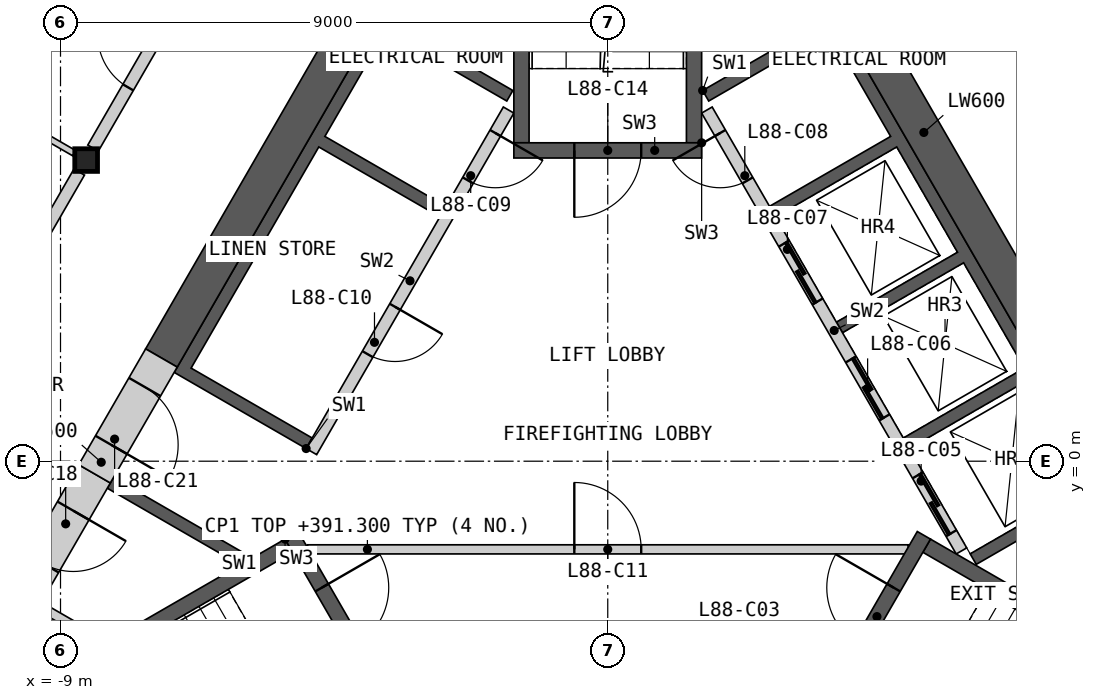
"""IFC4 building model, lengths in metres.
Left out: names, types, materials, properties, quantities, classifications, styles, units other than length and angle.
Written with IfcOpenShell. Run it as: python <this file> out.ifc"""

import sys

from ifc_helpers import new_model, si_unit, direction, frame, frame_2d, origin, origin_2d, place, context, subcontext, project, spatial, polyline, rectangle, i_section, outline, extrude, element, fill, save


model = new_model("IFC4")
c1 = context("Model", 3, precision=1e-05, world=origin(), true_north=direction((0.0, 1.0)))
c2 = subcontext(c1, "Body", "Model", "MODEL_VIEW")
j1 = project(units=[si_unit("LENGTHUNIT", "METRE"), si_unit("PLANEANGLEUNIT", "RADIAN")], contexts=[c1])
p1 = place(None, origin())
s1 = spatial("IfcSite", under=j1, at=p1, CompositionType="ELEMENT")
p2 = place(p1, origin())
s2 = spatial("IfcBuilding", under=s1, at=p2, CompositionType="ELEMENT")
p3 = place(p2, frame((0.0, 0.0, 388.2)))
s3 = spatial("IfcBuildingStorey", under=s2, at=p3, CompositionType="ELEMENT", Elevation=388.2)
p4 = place(p3, frame((-8.578, 4.953, 0.0), z_axis=(0.0, 0.0, 1.0), x_axis=(1.0, 0.0, 0.0)))
e1 = element("IfcColumn", 1, at=p4, inside=s3, PredefinedType="COLUMN", context=c2, shape_type="SweptSolid", body=[
    extrude(i_section(OverallWidth=0.374, OverallDepth=0.372, WebThickness=0.016, FlangeThickness=0.026, at=origin_2d()), origin(), (0.0, 0.0, 1.0), 3.4),
])
p5 = place(p3, origin())
e2 = element("IfcWall", 2, at=p5, inside=s3, PredefinedType="SHEAR", context=c2, shape_type="SweptSolid", body=[
    extrude(outline(polyline([(1.561, 6.097), (3.731, 7.35), (8.231, -0.444), (6.061, -1.697), (5.96, -1.524), (7.952, -0.374), (6.952, 1.358), (4.96, 0.208), (4.861, 0.381), (6.852, 1.531), (5.852, 3.263), (3.861, 2.113), (3.76, 2.287), (5.752, 3.437), (4.752, 5.169), (2.76, 4.019), (2.66, 4.192), (4.652, 5.342), (3.652, 7.074), (1.66, 5.924), (1.561, 6.097)])), origin(), (0.0, 0.0, 1.0), 3.1),
])
p6 = place(p3, frame((5.817, -1.476, 0.0), z_axis=(0.0, 0.0, 1.0), x_axis=(-0.500002616675, 0.866023893041, 0.0)))
e3 = element("IfcWall", 3, at=p6, inside=s3, PredefinedType="SOLIDWALL", context=c2, shape_type="SweptSolid", body=[
    extrude(rectangle(XDim=8.373, YDim=0.2, at=frame_2d((4.187, 0.0))), origin(), (0.0, 0.0, 1.0), 3.1),
])
p7 = place(p6, frame((0.337, 0.0, 0.0)))
e4 = element("IfcOpeningElement", 4, at=p7, cuts=e3, PredefinedType="OPENING", context=c2, shape_type="SweptSolid", body=[
    extrude(rectangle(XDim=1.1, YDim=2.1, at=frame_2d((0.55, 1.05))), frame((0.0, 0.11, 0.0), z_axis=(0.0, -1.0, 0.0), x_axis=(1.0, 0.0, 0.0)), (0.0, 0.0, 1.0), 0.22),
])
p8 = place(p6, frame((2.537, 0.0, 0.0)))
e5 = element("IfcOpeningElement", 5, at=p8, cuts=e3, PredefinedType="OPENING", context=c2, shape_type="SweptSolid", body=[
    extrude(rectangle(XDim=1.1, YDim=2.1, at=frame_2d((0.55, 1.05))), frame((0.0, 0.11, 0.0), z_axis=(0.0, -1.0, 0.0), x_axis=(1.0, 0.0, 0.0)), (0.0, 0.0, 1.0), 0.22),
])
p9 = place(p6, frame((4.737, 0.0, 0.0)))
e6 = element("IfcOpeningElement", 6, at=p9, cuts=e3, PredefinedType="OPENING", context=c2, shape_type="SweptSolid", body=[
    extrude(rectangle(XDim=1.1, YDim=2.1, at=frame_2d((0.55, 1.05))), frame((0.0, 0.11, 0.0), z_axis=(0.0, -1.0, 0.0), x_axis=(1.0, 0.0, 0.0)), (0.0, 0.0, 1.0), 0.22),
])
p10 = place(p6, frame((7.037, 0.0, 0.0)))
e7 = element("IfcOpeningElement", 7, at=p10, cuts=e3, PredefinedType="OPENING", context=c2, shape_type="SweptSolid", body=[
    extrude(rectangle(XDim=0.9, YDim=2.1, at=frame_2d((0.45, 1.05))), frame((0.0, 0.11, 0.0), z_axis=(0.0, -1.0, 0.0), x_axis=(1.0, 0.0, 0.0)), (0.0, 0.0, 1.0), 0.22),
])
p11 = place(p3, origin())
e8 = element("IfcWall", 8, at=p11, inside=s3, PredefinedType="SHEAR", context=c2, shape_type="SweptSolid", body=[
    extrude(outline(polyline([(-6.061, -1.697), (-8.231, -0.444), (-8.131, -0.271), (-5.96, -1.524), (-6.061, -1.697)])), origin(), (0.0, 0.0, 1.0), 3.1),
])
p12 = place(p3, origin())
e9 = element("IfcWall", 9, at=p12, inside=s3, PredefinedType="SHEAR", context=c2, shape_type="SweptSolid", body=[
    extrude(outline(polyline([(-4.96, 0.208), (-7.131, 1.461), (-3.731, 7.35), (-1.561, 6.097), (-1.66, 5.924), (-3.652, 7.074), (-4.652, 5.342), (-2.66, 4.192), (-2.76, 4.019), (-4.752, 5.169), (-6.852, 1.531), (-4.861, 0.381), (-4.96, 0.208)])), origin(), (0.0, 0.0, 1.0), 3.1),
])
p13 = place(p3, frame((-1.631, 5.776, 0.0), z_axis=(0.0, 0.0, 1.0), x_axis=(-0.499992876559, -0.866029516466, 0.0)))
e10 = element("IfcWall", 10, at=p13, inside=s3, PredefinedType="SOLIDWALL", context=c2, shape_type="SweptSolid", body=[
    extrude(rectangle(XDim=6.486, YDim=0.2, at=frame_2d((3.243, 0.0))), origin(), (0.0, 0.0, 1.0), 3.1),
])
p14 = place(p13, frame((0.437, 0.0, 0.0)))
e11 = element("IfcOpeningElement", 11, at=p14, cuts=e10, PredefinedType="OPENING", context=c2, shape_type="SweptSolid", body=[
    extrude(rectangle(XDim=0.9, YDim=2.1, at=frame_2d((0.45, 1.05))), frame((0.0, 0.11, 0.0), z_axis=(0.0, -1.0, 0.0), x_axis=(1.0, 0.0, 0.0)), (0.0, 0.0, 1.0), 0.22),
])
p15 = place(p13, frame((3.737, 0.0, 0.0)))
e12 = element("IfcOpeningElement", 12, at=p15, cuts=e10, PredefinedType="OPENING", context=c2, shape_type="SweptSolid", body=[
    extrude(rectangle(XDim=0.9, YDim=2.1, at=frame_2d((0.45, 1.05))), frame((0.0, 0.11, 0.0), z_axis=(0.0, -1.0, 0.0), x_axis=(1.0, 0.0, 0.0)), (0.0, 0.0, 1.0), 0.22),
])
p16 = place(p3, frame((-4.941, -1.45, 0.0), z_axis=(0.0, 0.0, 1.0), x_axis=(1.0, 0.0, 0.0)))
e13 = element("IfcWall", 13, at=p16, inside=s3, PredefinedType="PARTITIONING", context=c2, shape_type="SweptSolid", body=[
    extrude(rectangle(XDim=9.882, YDim=0.15, at=frame_2d((4.941, 0.0))), origin(), (0.0, 0.0, 1.0), 3.1),
])
p17 = place(p16, frame((4.391, 0.0, 0.0)))
e14 = element("IfcOpeningElement", 14, at=p17, cuts=e13, PredefinedType="OPENING", context=c2, shape_type="SweptSolid", body=[
    extrude(rectangle(XDim=1.1, YDim=2.1, at=frame_2d((0.55, 1.05))), frame((0.0, 0.085, 0.0), z_axis=(0.0, -1.0, 0.0), x_axis=(1.0, 0.0, 0.0)), (0.0, 0.0, 1.0), 0.17),
])
p18 = place(p3, origin())
e15 = element("IfcWall", 15, at=p18, inside=s3, PredefinedType="SHEAR", context=c2, shape_type="SweptSolid", body=[
    extrude(outline(polyline([(-5.307, -1.281), (-10.374, -4.206), (-10.032, -4.298), (-5.182, -1.498), (-5.307, -1.281)])), origin(), (0.0, 0.0, 1.0), 3.1),
])
p19 = place(p3, frame((-5.199, -1.219, 0.0), z_axis=(0.0, 0.0, 1.0), x_axis=(0.499982516597, -0.866035497597, 0.0)))
e16 = element("IfcWall", 16, at=p19, inside=s3, PredefinedType="SHEAR", context=c2, shape_type="SweptSolid", body=[
    extrude(rectangle(XDim=3.088, YDim=0.25, at=frame_2d((1.544, 0.0))), origin(), (0.0, 0.0, 1.0), 3.1),
])
p20 = place(p19, frame((0.994, 0.0, 0.0)))
e17 = element("IfcOpeningElement", 17, at=p20, cuts=e16, PredefinedType="OPENING", context=c2, shape_type="SweptSolid", body=[
    extrude(rectangle(XDim=1.1, YDim=2.1, at=frame_2d((0.55, 1.05))), frame((0.0, 0.135, 0.0), z_axis=(0.0, -1.0, 0.0), x_axis=(1.0, 0.0, 0.0)), (0.0, 0.0, 1.0), 0.27),
])
p21 = place(p3, origin())
e18 = element("IfcWall", 18, at=p21, inside=s3, PredefinedType="SHEAR", context=c2, shape_type="SweptSolid", body=[
    extrude(outline(polyline([(10.032, -4.298), (10.374, -4.206), (5.307, -1.281), (5.182, -1.498), (10.032, -4.298)])), origin(), (0.0, 0.0, 1.0), 3.1),
])
p22 = place(p3, frame((3.655, -3.893, 0.0), z_axis=(0.0, 0.0, 1.0), x_axis=(0.499982516597, 0.866035497597, 0.0)))
e19 = element("IfcWall", 19, at=p22, inside=s3, PredefinedType="SHEAR", context=c2, shape_type="SweptSolid", body=[
    extrude(rectangle(XDim=3.088, YDim=0.25, at=frame_2d((1.544, 0.0))), origin(), (0.0, 0.0, 1.0), 3.1),
])
p23 = place(p22, frame((0.994, 0.0, 0.0)))
e20 = element("IfcOpeningElement", 20, at=p23, cuts=e19, PredefinedType="OPENING", context=c2, shape_type="SweptSolid", body=[
    extrude(rectangle(XDim=1.1, YDim=2.1, at=frame_2d((0.55, 1.05))), frame((0.0, 0.135, 0.0), z_axis=(0.0, -1.0, 0.0), x_axis=(1.0, 0.0, 0.0)), (0.0, 0.0, 1.0), 0.27),
])
p24 = place(p3, origin())
e21 = element("IfcWall", 21, at=p24, inside=s3, PredefinedType="SHEAR", context=c2, shape_type="SweptSolid", body=[
    extrude(outline(polyline([(1.544, 5.237), (1.544, 11.087), (1.294, 10.837), (1.294, 5.237), (1.544, 5.237)])), origin(), (0.0, 0.0, 1.0), 3.1),
])
p25 = place(p3, origin())
e22 = element("IfcWall", 22, at=p25, inside=s3, PredefinedType="SHEAR", context=c2, shape_type="SweptSolid", body=[
    extrude(outline(polyline([(-1.294, 10.837), (-1.544, 11.087), (-1.544, 5.237), (-1.294, 5.237), (-1.294, 10.837)])), origin(), (0.0, 0.0, 1.0), 3.1),
])
p26 = place(p3, frame((1.544, 5.112, 0.0), z_axis=(0.0, 0.0, 1.0), x_axis=(-1.0, 0.0, 0.0)))
e23 = element("IfcWall", 23, at=p26, inside=s3, PredefinedType="SHEAR", context=c2, shape_type="SweptSolid", body=[
    extrude(rectangle(XDim=3.088, YDim=0.25, at=frame_2d((1.544, 0.0))), origin(), (0.0, 0.0, 1.0), 3.1),
])
p27 = place(p26, frame((0.994, 0.0, 0.0)))
e24 = element("IfcOpeningElement", 24, at=p27, cuts=e23, PredefinedType="OPENING", context=c2, shape_type="SweptSolid", body=[
    extrude(rectangle(XDim=1.1, YDim=2.1, at=frame_2d((0.55, 1.05))), frame((0.0, 0.135, 0.0), z_axis=(0.0, -1.0, 0.0), x_axis=(1.0, 0.0, 0.0)), (0.0, 0.0, 1.0), 0.27),
])
p28 = place(p3, frame((-9.35, -2.383, 0.0), z_axis=(0.0, 0.0, 1.0), x_axis=(0.866057962423, -0.499943602543, 0.0)))
e25 = element("IfcWall", 25, at=p28, inside=s3, PredefinedType="PARTITIONING", context=c2, shape_type="SweptSolid", body=[
    extrude(rectangle(XDim=1.242, YDim=0.15, at=frame_2d((0.621, 0.0))), origin(), (0.0, 0.0, 1.0), 3.1),
])
p29 = place(p3, frame((8.841, -0.902, 0.0), z_axis=(0.0, 0.0, 1.0), x_axis=(-0.499995618375, 0.866027933502, 0.0)))
e26 = element("IfcWall", 26, at=p29, inside=s3, PredefinedType="SHEAR", context=c2, shape_type="SweptSolid", body=[
    extrude(rectangle(XDim=14.571, YDim=0.6, at=frame_2d((7.285, 0.0))), origin(), (0.0, 0.0, 1.0), 3.1),
])
p30 = place(p3, frame((-3.639, 8.107, 0.0), z_axis=(0.0, 0.0, 1.0), x_axis=(-0.49999180351, -0.866030135978, 0.0)))
e27 = element("IfcWall", 27, at=p30, inside=s3, PredefinedType="SHEAR", context=c2, shape_type="SweptSolid", body=[
    extrude(rectangle(XDim=7.401, YDim=0.6, at=frame_2d((3.701, 0.0))), origin(), (0.0, 0.0, 1.0), 3.1),
])
p31 = place(p3, frame((-8.44, -0.208, 0.0), z_axis=(0.0, 0.0, 1.0), x_axis=(-0.500001951578, -0.866024277037, 0.0)))
e28 = element("IfcWall", 28, at=p31, inside=s3, PredefinedType="SHEAR", context=c2, shape_type="SweptSolid", body=[
    extrude(rectangle(XDim=2.243, YDim=0.6, at=frame_2d((1.122, 0.0))), origin(), (0.0, 0.0, 1.0), 3.1),
])
p32 = place(p31, frame((0.7, 0.0, 0.0)))
e29 = element("IfcOpeningElement", 29, at=p32, cuts=e28, PredefinedType="OPENING", context=c2, shape_type="SweptSolid", body=[
    extrude(rectangle(XDim=1.0, YDim=2.1, at=frame_2d((0.5, 1.05))), frame((0.0, 0.31, 0.0), z_axis=(0.0, -1.0, 0.0), x_axis=(1.0, 0.0, 0.0)), (0.0, 0.0, 1.0), 0.62),
])
p33 = place(p3, frame((-7.34, 1.698, 0.0), z_axis=(0.0, 0.0, 1.0), x_axis=(-0.50002983664, -0.866008176907, 0.0)))
e30 = element("IfcWall", 30, at=p33, inside=s3, PredefinedType="SHEAR", context=c2, shape_type="SweptSolid", body=[
    extrude(rectangle(XDim=2.2, YDim=0.6, at=frame_2d((1.1, 0.0))), origin(), (0.0, 0.0, 1.0), 3.1),
])
p34 = place(p33, frame((0.55, 0.0, 0.0)))
e31 = element("IfcOpeningElement", 31, at=p34, cuts=e30, PredefinedType="OPENING", context=c2, shape_type="SweptSolid", body=[
    extrude(rectangle(XDim=1.1, YDim=2.1, at=frame_2d((0.55, 1.05))), frame((0.0, 0.31, 0.0), z_axis=(0.0, -1.0, 0.0), x_axis=(1.0, 0.0, 0.0)), (0.0, 0.0, 1.0), 0.62),
])
p35 = place(p3, frame((4.403, 12.185, 0.0), z_axis=(0.0, 0.0, 1.0), x_axis=(0.499992155518, -0.866029932751, 0.0)))
e32 = element("IfcWall", 32, at=p35, inside=s3, PredefinedType="PARTITIONING", context=c2, shape_type="SweptSolid", body=[
    extrude(rectangle(XDim=8.123, YDim=0.2, at=frame_2d((4.062, 0.0))), origin(), (0.0, 0.0, 1.0), 3.1),
])
p36 = place(p35, frame((3.587, 0.0, 0.0)))
e33 = element("IfcOpeningElement", 33, at=p36, cuts=e32, PredefinedType="OPENING", context=c2, shape_type="SweptSolid", body=[
    extrude(rectangle(XDim=0.95, YDim=2.1, at=frame_2d((0.475, 1.05))), frame((0.0, 0.11, 0.0), z_axis=(0.0, -1.0, 0.0), x_axis=(1.0, 0.0, 0.0)), (0.0, 0.0, 1.0), 0.22),
])
p37 = place(p3, frame((-8.465, 5.15, 0.0), z_axis=(0.0, 0.0, 1.0), x_axis=(0.499992155518, 0.866029932751, 0.0)))
e34 = element("IfcWall", 34, at=p37, inside=s3, PredefinedType="PARTITIONING", context=c2, shape_type="SweptSolid", body=[
    extrude(rectangle(XDim=8.123, YDim=0.2, at=frame_2d((4.062, 0.0))), origin(), (0.0, 0.0, 1.0), 3.1),
])
p38 = place(p37, frame((1.153, 0.0, 0.0)))
e35 = element("IfcOpeningElement", 35, at=p38, cuts=e34, PredefinedType="OPENING", context=c2, shape_type="SweptSolid", body=[
    extrude(rectangle(XDim=1.0, YDim=2.1, at=frame_2d((0.5, 1.05))), frame((0.0, 0.11, 0.0), z_axis=(0.0, -1.0, 0.0), x_axis=(1.0, 0.0, 0.0)), (0.0, 0.0, 1.0), 0.22),
])
p39 = place(p3, frame((-12.754, -2.279, 0.0), z_axis=(0.0, 0.0, 1.0), x_axis=(0.500001682468, 0.866024432409, 0.0)))
e36 = element("IfcWall", 36, at=p39, inside=s3, PredefinedType="PARTITIONING", context=c2, shape_type="SweptSolid", body=[
    extrude(rectangle(XDim=8.124, YDim=0.2, at=frame_2d((4.062, 0.0))), origin(), (0.0, 0.0, 1.0), 3.1),
])
p40 = place(p39, frame((1.153, 0.0, 0.0)))
e37 = element("IfcOpeningElement", 37, at=p40, cuts=e36, PredefinedType="OPENING", context=c2, shape_type="SweptSolid", body=[
    extrude(rectangle(XDim=1.0, YDim=2.1, at=frame_2d((0.5, 1.05))), frame((0.0, 0.11, 0.0), z_axis=(0.0, -1.0, 0.0), x_axis=(1.0, 0.0, 0.0)), (0.0, 0.0, 1.0), 0.22),
])
p41 = place(p3, frame((3.926, 19.811, 0.0), z_axis=(0.0, 0.0, 1.0), x_axis=(0.500001082559, -0.866024778768, 0.0)))
e38 = element("IfcWall", 38, at=p41, inside=s3, PredefinedType="PARTITIONING", context=c2, shape_type="SweptSolid", body=[
    extrude(rectangle(XDim=15.094, YDim=0.2, at=frame_2d((7.547, 0.0))), origin(), (0.0, 0.0, 1.0), 2.33),
])
p42 = place(p41, frame((3.761, 0.0, 0.0)))
e39 = element("IfcOpeningElement", 39, at=p42, cuts=e38, PredefinedType="OPENING", context=c2, shape_type="SweptSolid", body=[
    extrude(rectangle(XDim=0.95, YDim=2.1, at=frame_2d((0.475, 1.05))), frame((0.0, 0.11, 0.0), z_axis=(0.0, -1.0, 0.0), x_axis=(1.0, 0.0, 0.0)), (0.0, 0.0, 1.0), 0.22),
])
p43 = place(p3, frame((-18.869, 10.894, 0.0), z_axis=(0.0, 0.0, 1.0), x_axis=(0.866023724155, -0.500002909193, 0.0)))
e40 = element("IfcWall", 40, at=p43, inside=s3, PredefinedType="PARTITIONING", context=c2, shape_type="SweptSolid", body=[
    extrude(rectangle(XDim=11.655, YDim=0.1, at=frame_2d((5.827, 0.0))), origin(), (0.0, 0.0, 1.0), 2.33),
])
p44 = place(p43, frame((6.253, 0.0, 0.0)))
e41 = element("IfcOpeningElement", 41, at=p44, cuts=e40, PredefinedType="OPENING", context=c2, shape_type="SweptSolid", body=[
    extrude(rectangle(XDim=0.95, YDim=2.1, at=frame_2d((0.475, 1.05))), frame((0.0, 0.06, 0.0), z_axis=(0.0, -1.0, 0.0), x_axis=(1.0, 0.0, 0.0)), (0.0, 0.0, 1.0), 0.12),
])
p45 = place(p7, origin())
e42 = element("IfcDoor", 42, at=p45, inside=s3, OperationType="SLIDING_TO_LEFT", PredefinedType="DOOR", context=c2, shape_type="SweptSolid", body=[
    extrude(rectangle(XDim=1.1, YDim=2.1, at=frame_2d((0.55, 1.05))), frame((0.0, 0.025, 0.0), z_axis=(0.0, -1.0, 0.0), x_axis=(1.0, 0.0, 0.0)), (0.0, 0.0, 1.0), 0.05),
])
fill(e4, e42)
p46 = place(p8, origin())
e43 = element("IfcDoor", 43, at=p46, inside=s3, OperationType="SLIDING_TO_LEFT", PredefinedType="DOOR", context=c2, shape_type="SweptSolid", body=[
    extrude(rectangle(XDim=1.1, YDim=2.1, at=frame_2d((0.55, 1.05))), frame((0.0, 0.025, 0.0), z_axis=(0.0, -1.0, 0.0), x_axis=(1.0, 0.0, 0.0)), (0.0, 0.0, 1.0), 0.05),
])
fill(e5, e43)
p47 = place(p9, origin())
e44 = element("IfcDoor", 44, at=p47, inside=s3, OperationType="SLIDING_TO_LEFT", PredefinedType="DOOR", context=c2, shape_type="SweptSolid", body=[
    extrude(rectangle(XDim=1.1, YDim=2.1, at=frame_2d((0.55, 1.05))), frame((0.0, 0.025, 0.0), z_axis=(0.0, -1.0, 0.0), x_axis=(1.0, 0.0, 0.0)), (0.0, 0.0, 1.0), 0.05),
])
fill(e6, e44)
p48 = place(p10, origin())
e45 = element("IfcDoor", 45, at=p48, inside=s3, OperationType="SINGLE_SWING_RIGHT", PredefinedType="DOOR", context=c2, shape_type="SweptSolid", body=[
    extrude(rectangle(XDim=0.9, YDim=2.1, at=frame_2d((0.45, 1.05))), frame((0.0, 0.025, 0.0), z_axis=(0.0, -1.0, 0.0), x_axis=(1.0, 0.0, 0.0)), (0.0, 0.0, 1.0), 0.05),
])
fill(e7, e45)
p49 = place(p14, origin())
e46 = element("IfcDoor", 46, at=p49, inside=s3, OperationType="SINGLE_SWING_LEFT", PredefinedType="DOOR", context=c2, shape_type="SweptSolid", body=[
    extrude(rectangle(XDim=0.9, YDim=2.1, at=frame_2d((0.45, 1.05))), frame((0.0, 0.025, 0.0), z_axis=(0.0, -1.0, 0.0), x_axis=(1.0, 0.0, 0.0)), (0.0, 0.0, 1.0), 0.05),
])
fill(e11, e46)
p50 = place(p15, origin())
e47 = element("IfcDoor", 47, at=p50, inside=s3, OperationType="SINGLE_SWING_LEFT", PredefinedType="DOOR", context=c2, shape_type="SweptSolid", body=[
    extrude(rectangle(XDim=0.9, YDim=2.1, at=frame_2d((0.45, 1.05))), frame((0.0, 0.025, 0.0), z_axis=(0.0, -1.0, 0.0), x_axis=(1.0, 0.0, 0.0)), (0.0, 0.0, 1.0), 0.05),
])
fill(e12, e47)
p51 = place(p17, origin())
e48 = element("IfcDoor", 48, at=p51, inside=s3, OperationType="SINGLE_SWING_LEFT", PredefinedType="DOOR", context=c2, shape_type="SweptSolid", body=[
    extrude(rectangle(XDim=1.1, YDim=2.1, at=frame_2d((0.55, 1.05))), frame((0.0, 0.025, 0.0), z_axis=(0.0, -1.0, 0.0), x_axis=(1.0, 0.0, 0.0)), (0.0, 0.0, 1.0), 0.05),
])
fill(e14, e48)
p52 = place(p20, origin())
e49 = element("IfcDoor", 49, at=p52, inside=s3, OperationType="SINGLE_SWING_LEFT", PredefinedType="DOOR", context=c2, shape_type="SweptSolid", body=[
    extrude(rectangle(XDim=1.1, YDim=2.1, at=frame_2d((0.55, 1.05))), frame((0.0, 0.025, 0.0), z_axis=(0.0, -1.0, 0.0), x_axis=(1.0, 0.0, 0.0)), (0.0, 0.0, 1.0), 0.05),
])
fill(e17, e49)
p53 = place(p23, origin())
e50 = element("IfcDoor", 50, at=p53, inside=s3, OperationType="SINGLE_SWING_RIGHT", PredefinedType="DOOR", context=c2, shape_type="SweptSolid", body=[
    extrude(rectangle(XDim=1.1, YDim=2.1, at=frame_2d((0.55, 1.05))), frame((0.0, 0.025, 0.0), z_axis=(0.0, -1.0, 0.0), x_axis=(1.0, 0.0, 0.0)), (0.0, 0.0, 1.0), 0.05),
])
fill(e20, e50)
p54 = place(p27, origin())
e51 = element("IfcDoor", 51, at=p54, inside=s3, OperationType="SINGLE_SWING_RIGHT", PredefinedType="DOOR", context=c2, shape_type="SweptSolid", body=[
    extrude(rectangle(XDim=1.1, YDim=2.1, at=frame_2d((0.55, 1.05))), frame((0.0, 0.025, 0.0), z_axis=(0.0, -1.0, 0.0), x_axis=(1.0, 0.0, 0.0)), (0.0, 0.0, 1.0), 0.05),
])
fill(e24, e51)
p55 = place(p32, origin())
e52 = element("IfcDoor", 52, at=p55, inside=s3, OperationType="SINGLE_SWING_LEFT", PredefinedType="DOOR", context=c2, shape_type="SweptSolid", body=[
    extrude(rectangle(XDim=1.0, YDim=2.1, at=frame_2d((0.5, 1.05))), frame((0.0, 0.055, 0.0), z_axis=(0.0, -1.0, 0.0), x_axis=(1.0, 0.0, 0.0)), (0.0, 0.0, 1.0), 0.05),
])
fill(e29, e52)
p56 = place(p34, origin())
e53 = element("IfcDoor", 53, at=p56, inside=s3, OperationType="SINGLE_SWING_RIGHT", PredefinedType="DOOR", context=c2, shape_type="SweptSolid", body=[
    extrude(rectangle(XDim=1.1, YDim=2.1, at=frame_2d((0.55, 1.05))), frame((0.0, 0.055, 0.0), z_axis=(0.0, -1.0, 0.0), x_axis=(1.0, 0.0, 0.0)), (0.0, 0.0, 1.0), 0.05),
])
fill(e31, e53)
p57 = place(p38, origin())
e54 = element("IfcDoor", 54, at=p57, inside=s3, OperationType="SINGLE_SWING_RIGHT", PredefinedType="DOOR", context=c2, shape_type="SweptSolid", body=[
    extrude(rectangle(XDim=1.0, YDim=2.1, at=frame_2d((0.5, 1.05))), frame((0.0, 0.025, 0.0), z_axis=(0.0, -1.0, 0.0), x_axis=(1.0, 0.0, 0.0)), (0.0, 0.0, 1.0), 0.05),
])
fill(e35, e54)
save(model, sys.argv[1])
